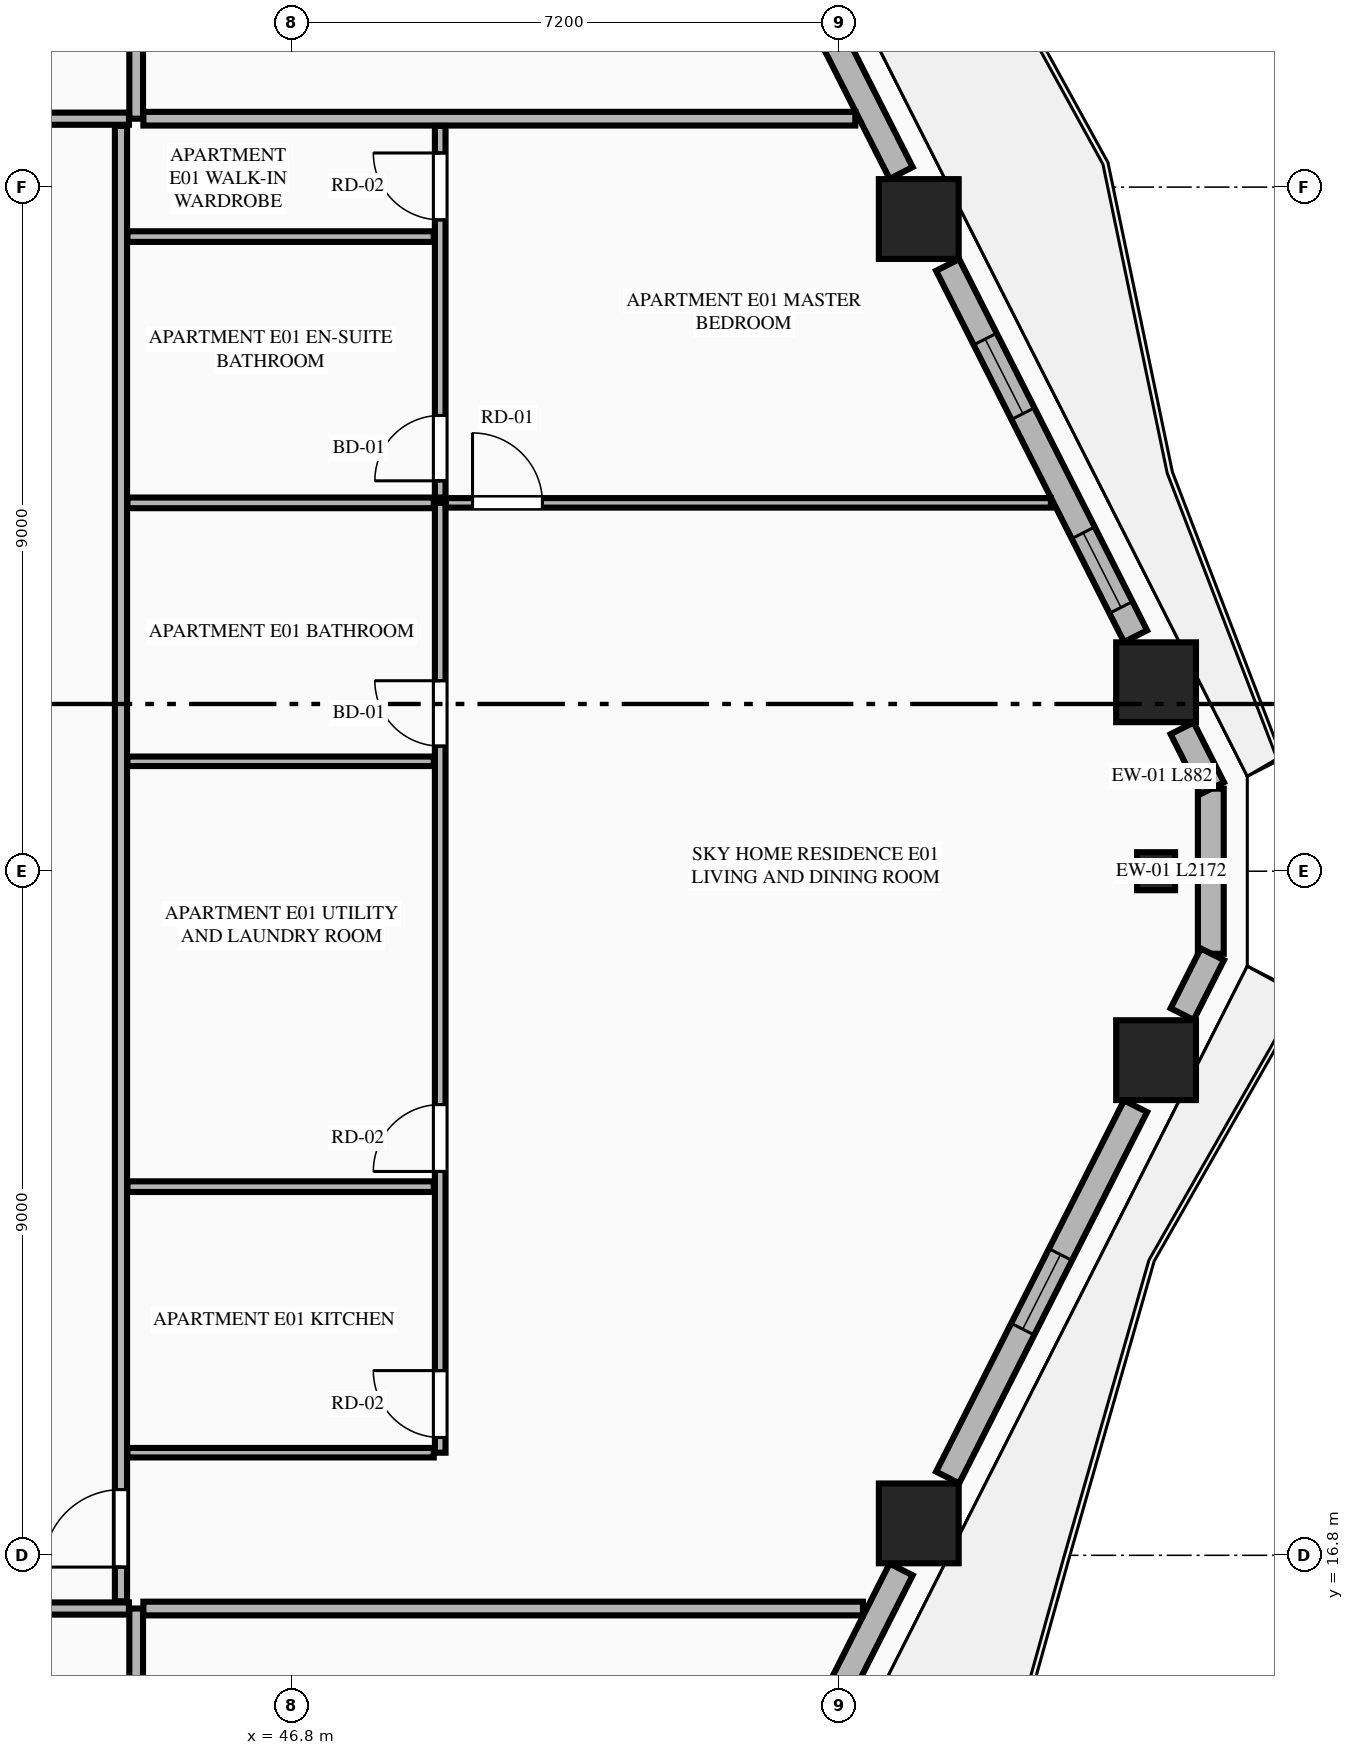
"""IFC4 building model, lengths in metres.
Left out: names, types, materials, properties, quantities, classifications, styles, units other than length and angle.
Written with IfcOpenShell. Run it as: python <this file> out.ifc"""

import sys

from ifc_helpers import new_model, si_unit, direction, frame, frame_2d, origin, origin_2d, place, context, subcontext, project, spatial, rectangle, extrude, element, fill, save


model = new_model("IFC4")
c1 = context("Model", 3, precision=1e-05, world=origin(), true_north=direction((0.0, 1.0)))
c2 = subcontext(c1, "Body", "Model", "MODEL_VIEW")
j1 = project(units=[si_unit("LENGTHUNIT", "METRE"), si_unit("PLANEANGLEUNIT", "RADIAN")], contexts=[c1])
p1 = place(None, origin())
s1 = spatial("IfcSite", under=j1, at=p1, CompositionType="ELEMENT")
p2 = place(p1, origin())
s2 = spatial("IfcBuilding", under=s1, at=p2, CompositionType="ELEMENT")
p3 = place(p2, frame((0.0, 0.0, 80.0)))
s3 = spatial("IfcBuildingStorey", under=s2, at=p3, CompositionType="ELEMENT", Elevation=80.0)
for number, where, z_axis, x_axis in (
    (1, (55.046, 17.22, 0.0), (0.0, 0.0, 1.0), (1.0, 0.0, 0.0)),
    (2, (58.168, 23.314, 0.0), (0.0, 0.0, 1.0), (1.0, 0.0, 0.0)),
    (3, (58.168, 28.286, 0.0), (0.0, 0.0, 1.0), (1.0, 0.0, 0.0)),
    (4, (55.046, 34.38, 0.0), (0.0, 0.0, 1.0), (1.0, 0.0, 0.0)),
):
    element("IfcColumn", number, at=place(p3, frame(where, z_axis=z_axis, x_axis=x_axis)), inside=s3, PredefinedType="COLUMN", context=c2, shape_type="SweptSolid", body=[
        extrude(rectangle(XDim=1.05, YDim=1.05, at=origin_2d()), origin(), (0.0, 0.0, 1.0), 3.55),
    ])
p4 = place(p3, frame((58.168, 25.8, 0.0), z_axis=(0.0, 0.0, 1.0), x_axis=(0.0, 1.0, 0.0)))
e5 = element("IfcColumn", 5, at=p4, inside=s3, PredefinedType="PILASTER", context=c2, shape_type="SweptSolid", body=[
    extrude(rectangle(XDim=0.5, YDim=0.35, at=origin_2d()), origin(), (0.0, 0.0, 1.0), 3.55),
])
p5 = place(p3, frame((58.888, 24.714, 0.0), z_axis=(0.0, 0.0, 1.0), x_axis=(0.0, 1.0, 0.0)))
e6 = element("IfcWall", 6, at=p5, inside=s3, PredefinedType="STANDARD", context=c2, shape_type="SweptSolid", body=[
    extrude(rectangle(XDim=2.172, YDim=0.34, at=frame_2d((1.086, 0.0))), origin(), (0.0, 0.0, 1.0), 3.33),
])
p6 = place(p3, frame((52.233, 11.515, 0.0), z_axis=(0.0, 0.0, 1.0), x_axis=(0.451616680182, 0.892212067942, 0.0)))
e7 = element("IfcWall", 7, at=p6, inside=s3, PredefinedType="STANDARD", context=c2, shape_type="SweptSolid", body=[
    extrude(rectangle(XDim=5.715, YDim=0.34, at=frame_2d((2.857, 0.0))), origin(), (0.0, 0.0, 1.0), 2.787),
])
p7 = place(p6, frame((1.894, 0.0, 0.0)))
e8 = element("IfcOpeningElement", 8, at=p7, cuts=e7, PredefinedType="OPENING", context=c2, shape_type="SweptSolid", body=[
    extrude(rectangle(XDim=1.1, YDim=2.25, at=frame_2d((0.55, 1.125))), frame((0.0, 0.18, 0.0), z_axis=(0.0, -1.0, 0.0), x_axis=(1.0, 0.0, 0.0)), (0.0, 0.0, 1.0), 0.36),
])
p8 = place(p3, frame((55.426, 17.824, 0.0), z_axis=(0.0, 0.0, 1.0), x_axis=(0.451579095309, 0.892231091523, 0.0)))
e9 = element("IfcWall", 9, at=p8, inside=s3, PredefinedType="STANDARD", context=c2, shape_type="SweptSolid", body=[
    extrude(rectangle(XDim=5.474, YDim=0.34, at=frame_2d((2.737, 0.0))), origin(), (0.0, 0.0, 1.0), 2.787),
])
p9 = place(p8, frame((2.187, 0.0, 0.75)))
e10 = element("IfcOpeningElement", 10, at=p9, cuts=e9, PredefinedType="OPENING", context=c2, shape_type="SweptSolid", body=[
    extrude(rectangle(XDim=1.1, YDim=1.887, at=frame_2d((0.55, 0.943))), frame((0.0, 0.18, 0.0), z_axis=(0.0, -1.0, 0.0), x_axis=(1.0, 0.0, 0.0)), (0.0, 0.0, 1.0), 0.36),
])
p10 = place(p3, frame((58.511, 23.92, 0.0), z_axis=(0.0, 0.0, 1.0), x_axis=(0.451195173259, 0.892425299747, 0.0)))
e11 = element("IfcWall", 11, at=p10, inside=s3, PredefinedType="STANDARD", context=c2, shape_type="SweptSolid", body=[
    extrude(rectangle(XDim=0.882, YDim=0.34, at=frame_2d((0.441, 0.0))), origin(), (0.0, 0.0, 1.0), 3.33),
])
p11 = place(p3, frame((58.909, 26.893, 0.0), z_axis=(0.0, 0.0, 1.0), x_axis=(-0.451306655769, 0.892368927327, 0.0)))
e12 = element("IfcWall", 12, at=p11, inside=s3, PredefinedType="STANDARD", context=c2, shape_type="SweptSolid", body=[
    extrude(rectangle(XDim=0.882, YDim=0.34, at=frame_2d((0.441, 0.0))), origin(), (0.0, 0.0, 1.0), 3.33),
])
p12 = place(p3, frame((57.898, 28.892, 0.0), z_axis=(0.0, 0.0, 1.0), x_axis=(-0.451597066012, 0.892221995901, 0.0)))
e13 = element("IfcWall", 13, at=p12, inside=s3, PredefinedType="STANDARD", context=c2, shape_type="SweptSolid", body=[
    extrude(rectangle(XDim=5.474, YDim=0.34, at=frame_2d((2.737, 0.0))), origin(), (0.0, 0.0, 1.0), 2.787),
])
p13 = place(p12, frame((0.424, 0.0, 0.75)))
e14 = element("IfcOpeningElement", 14, at=p13, cuts=e13, PredefinedType="OPENING", context=c2, shape_type="SweptSolid", body=[
    extrude(rectangle(XDim=1.1, YDim=1.887, at=frame_2d((0.55, 0.943))), frame((0.0, 0.18, 0.0), z_axis=(0.0, -1.0, 0.0), x_axis=(1.0, 0.0, 0.0)), (0.0, 0.0, 1.0), 0.36),
])
p14 = place(p12, frame((3.281, 0.0, 0.75)))
e15 = element("IfcOpeningElement", 15, at=p14, cuts=e13, PredefinedType="OPENING", context=c2, shape_type="SweptSolid", body=[
    extrude(rectangle(XDim=1.1, YDim=1.887, at=frame_2d((0.55, 0.943))), frame((0.0, 0.18, 0.0), z_axis=(0.0, -1.0, 0.0), x_axis=(1.0, 0.0, 0.0)), (0.0, 0.0, 1.0), 0.36),
])
p15 = place(p3, frame((54.814, 34.986, 0.0), z_axis=(0.0, 0.0, 1.0), x_axis=(-0.451633893529, 0.892203354744, 0.0)))
e16 = element("IfcWall", 16, at=p15, inside=s3, PredefinedType="STANDARD", context=c2, shape_type="SweptSolid", body=[
    extrude(rectangle(XDim=5.715, YDim=0.34, at=frame_2d((2.857, 0.0))), origin(), (0.0, 0.0, 1.0), 2.787),
])
p16 = place(p15, frame((2.833, 0.0, 0.0)))
e17 = element("IfcOpeningElement", 17, at=p16, cuts=e16, PredefinedType="OPENING", context=c2, shape_type="SweptSolid", body=[
    extrude(rectangle(XDim=1.1, YDim=2.25, at=frame_2d((0.55, 1.125))), frame((0.0, 0.18, 0.0), z_axis=(0.0, -1.0, 0.0), x_axis=(1.0, 0.0, 0.0)), (0.0, 0.0, 1.0), 0.36),
])
p17 = place(p3, frame((44.75, 2.455, 0.0), z_axis=(0.0, 0.0, 1.0), x_axis=(0.0, 1.0, 0.0)))
e18 = element("IfcWall", 18, at=p17, inside=s3, PredefinedType="PARTITIONING", context=c2, shape_type="SweptSolid", body=[
    extrude(rectangle(XDim=13.645, YDim=0.18, at=frame_2d((6.823, 0.0))), origin(), (0.0, 0.0, 1.0), 3.33),
])
p18 = place(p3, frame((20.145, 16.1, 0.0), z_axis=(0.0, 0.0, 1.0), x_axis=(1.0, 0.0, 0.0)))
e19 = element("IfcWall", 19, at=p18, inside=s3, PredefinedType="PARTITIONING", context=c2, shape_type="SweptSolid", body=[
    extrude(rectangle(XDim=24.51, YDim=0.16, at=frame_2d((12.255, 0.0))), origin(), (0.0, 0.0, 1.0), 3.33),
])
p19 = place(p18, frame((22.305, 0.0, 0.0)))
e20 = element("IfcOpeningElement", 20, at=p19, cuts=e19, PredefinedType="OPENING", context=c2, shape_type="SweptSolid", body=[
    extrude(rectangle(XDim=1.02, YDim=2.25, at=frame_2d((0.51, 1.125))), frame((0.0, 0.09, 0.0), z_axis=(0.0, -1.0, 0.0), x_axis=(1.0, 0.0, 0.0)), (0.0, 0.0, 1.0), 0.18),
])
p20 = place(p3, frame((44.75, 35.7, 0.0), z_axis=(0.0, 0.0, 1.0), x_axis=(0.0, 1.0, 0.0)))
e21 = element("IfcWall", 21, at=p20, inside=s3, PredefinedType="PARTITIONING", context=c2, shape_type="SweptSolid", body=[
    extrude(rectangle(XDim=13.445, YDim=0.18, at=frame_2d((6.723, 0.0))), origin(), (0.0, 0.0, 1.0), 3.33),
])
p21 = place(p3, frame((20.145, 35.7, 0.0), z_axis=(0.0, 0.0, 1.0), x_axis=(1.0, 0.0, 0.0)))
e22 = element("IfcWall", 22, at=p21, inside=s3, PredefinedType="PARTITIONING", context=c2, shape_type="SweptSolid", body=[
    extrude(rectangle(XDim=24.51, YDim=0.16, at=frame_2d((12.255, 0.0))), origin(), (0.0, 0.0, 1.0), 3.33),
])
p22 = place(p21, frame((22.305, 0.0, 0.0)))
e23 = element("IfcOpeningElement", 23, at=p22, cuts=e22, PredefinedType="OPENING", context=c2, shape_type="SweptSolid", body=[
    extrude(rectangle(XDim=1.02, YDim=2.25, at=frame_2d((0.51, 1.125))), frame((0.0, 0.09, 0.0), z_axis=(0.0, -1.0, 0.0), x_axis=(1.0, 0.0, 0.0)), (0.0, 0.0, 1.0), 0.18),
])
p23 = place(p3, frame((44.845, 16.1, 0.0), z_axis=(0.0, 0.0, 1.0), x_axis=(1.0, 0.0, 0.0)))
e24 = element("IfcWall", 24, at=p23, inside=s3, PredefinedType="PARTITIONING", context=c2, shape_type="SweptSolid", body=[
    extrude(rectangle(XDim=9.467, YDim=0.18, at=frame_2d((4.733, 0.0))), origin(), (0.0, 0.0, 1.0), 3.33),
])
p24 = place(p3, frame((44.845, 35.7, 0.0), z_axis=(0.0, 0.0, 1.0), x_axis=(1.0, 0.0, 0.0)))
e25 = element("IfcWall", 25, at=p24, inside=s3, PredefinedType="PARTITIONING", context=c2, shape_type="SweptSolid", body=[
    extrude(rectangle(XDim=9.366, YDim=0.18, at=frame_2d((4.683, 0.0))), origin(), (0.0, 0.0, 1.0), 3.33),
])
p25 = place(p3, frame((44.55, 16.195, 0.0), z_axis=(0.0, 0.0, 1.0), x_axis=(0.0, 1.0, 0.0)))
e26 = element("IfcWall", 26, at=p25, inside=s3, PredefinedType="PARTITIONING", context=c2, shape_type="SweptSolid", body=[
    extrude(rectangle(XDim=19.41, YDim=0.16, at=frame_2d((9.705, 0.0))), origin(), (0.0, 0.0, 1.0), 2.7),
])
p26 = place(p25, frame((0.45, 0.0, 0.0)))
e27 = element("IfcOpeningElement", 27, at=p26, cuts=e26, PredefinedType="OPENING", context=c2, shape_type="SweptSolid", body=[
    extrude(rectangle(XDim=1.02, YDim=2.25, at=frame_2d((0.51, 1.125))), frame((0.0, 0.09, 0.0), z_axis=(0.0, -1.0, 0.0), x_axis=(1.0, 0.0, 0.0)), (0.0, 0.0, 1.0), 0.18),
])
p27 = place(p3, frame((44.635, 18.15, 0.0), z_axis=(0.0, 0.0, 1.0), x_axis=(1.0, 0.0, 0.0)))
e28 = element("IfcWall", 28, at=p27, inside=s3, PredefinedType="PARTITIONING", context=c2, shape_type="SweptSolid", body=[
    extrude(rectangle(XDim=4.03, YDim=0.125, at=frame_2d((2.015, 0.0))), origin(), (0.0, 0.0, 1.0), 2.7),
])
p28 = place(p3, frame((48.75, 18.15, 0.0), z_axis=(0.0, 0.0, 1.0), x_axis=(0.0, 1.0, 0.0)))
e29 = element("IfcWall", 29, at=p28, inside=s3, PredefinedType="PLUMBINGWALL", context=c2, shape_type="SweptSolid", body=[
    extrude(rectangle(XDim=12.496, YDim=0.14, at=frame_2d((6.248, 0.0))), origin(), (0.0, 0.0, 1.0), 3.33),
])
p29 = place(p28, frame((0.2, 0.0, 0.0)))
e30 = element("IfcOpeningElement", 30, at=p29, cuts=e29, PredefinedType="OPENING", context=c2, shape_type="SweptSolid", body=[
    extrude(rectangle(XDim=0.88, YDim=2.15, at=frame_2d((0.44, 1.075))), frame((0.0, 0.08, 0.0), z_axis=(0.0, -1.0, 0.0), x_axis=(1.0, 0.0, 0.0)), (0.0, 0.0, 1.0), 0.16),
])
p30 = place(p28, frame((3.7, 0.0, 0.0)))
e31 = element("IfcOpeningElement", 31, at=p30, cuts=e29, PredefinedType="OPENING", context=c2, shape_type="SweptSolid", body=[
    extrude(rectangle(XDim=0.88, YDim=2.15, at=frame_2d((0.44, 1.075))), frame((0.0, 0.08, 0.0), z_axis=(0.0, -1.0, 0.0), x_axis=(1.0, 0.0, 0.0)), (0.0, 0.0, 1.0), 0.16),
])
p31 = place(p28, frame((9.296, 0.0, 0.0)))
e32 = element("IfcOpeningElement", 32, at=p31, cuts=e29, PredefinedType="OPENING", context=c2, shape_type="SweptSolid", body=[
    extrude(rectangle(XDim=0.86, YDim=2.1, at=frame_2d((0.43, 1.05))), frame((0.0, 0.08, 0.0), z_axis=(0.0, -1.0, 0.0), x_axis=(1.0, 0.0, 0.0)), (0.0, 0.0, 1.0), 0.16),
])
p32 = place(p3, frame((48.75, 30.716, 0.0), z_axis=(0.0, 0.0, 1.0), x_axis=(0.0, 1.0, 0.0)))
e33 = element("IfcWall", 33, at=p32, inside=s3, PredefinedType="PLUMBINGWALL", context=c2, shape_type="SweptSolid", body=[
    extrude(rectangle(XDim=4.889, YDim=0.14, at=frame_2d((2.444, 0.0))), origin(), (0.0, 0.0, 1.0), 3.33),
])
p33 = place(p32, frame((0.22, 0.0, 0.0)))
e34 = element("IfcOpeningElement", 34, at=p33, cuts=e33, PredefinedType="OPENING", context=c2, shape_type="SweptSolid", body=[
    extrude(rectangle(XDim=0.86, YDim=2.1, at=frame_2d((0.43, 1.05))), frame((0.0, 0.08, 0.0), z_axis=(0.0, -1.0, 0.0), x_axis=(1.0, 0.0, 0.0)), (0.0, 0.0, 1.0), 0.16),
])
p34 = place(p32, frame((3.653, 0.0, 0.0)))
e35 = element("IfcOpeningElement", 35, at=p34, cuts=e33, PredefinedType="OPENING", context=c2, shape_type="SweptSolid", body=[
    extrude(rectangle(XDim=0.88, YDim=2.15, at=frame_2d((0.44, 1.075))), frame((0.0, 0.08, 0.0), z_axis=(0.0, -1.0, 0.0), x_axis=(1.0, 0.0, 0.0)), (0.0, 0.0, 1.0), 0.16),
])
p35 = place(p3, frame((44.635, 30.646, 0.0), z_axis=(0.0, 0.0, 1.0), x_axis=(1.0, 0.0, 0.0)))
e36 = element("IfcWall", 36, at=p35, inside=s3, PredefinedType="PLUMBINGWALL", context=c2, shape_type="SweptSolid", body=[
    extrude(rectangle(XDim=4.03, YDim=0.14, at=frame_2d((2.015, 0.0))), origin(), (0.0, 0.0, 1.0), 3.33),
])
p36 = place(p3, frame((48.825, 30.646, 0.0), z_axis=(0.0, 0.0, 1.0), x_axis=(1.0, 0.0, 0.0)))
e37 = element("IfcWall", 37, at=p36, inside=s3, PredefinedType="PARTITIONING", context=c2, shape_type="SweptSolid", body=[
    extrude(rectangle(XDim=7.959, YDim=0.125, at=frame_2d((3.979, 0.0))), origin(), (0.0, 0.0, 1.0), 3.33),
])
p37 = place(p36, frame((0.35, 0.0, 0.0)))
e38 = element("IfcOpeningElement", 38, at=p37, cuts=e37, PredefinedType="OPENING", context=c2, shape_type="SweptSolid", body=[
    extrude(rectangle(XDim=0.92, YDim=2.15, at=frame_2d((0.46, 1.075))), frame((0.0, 0.073, 0.0), z_axis=(0.0, -1.0, 0.0), x_axis=(1.0, 0.0, 0.0)), (0.0, 0.0, 1.0), 0.145),
])
p38 = place(p3, frame((44.635, 21.65, 0.0), z_axis=(0.0, 0.0, 1.0), x_axis=(1.0, 0.0, 0.0)))
e39 = element("IfcWall", 39, at=p38, inside=s3, PredefinedType="PLUMBINGWALL", context=c2, shape_type="SweptSolid", body=[
    extrude(rectangle(XDim=4.03, YDim=0.14, at=frame_2d((2.015, 0.0))), origin(), (0.0, 0.0, 1.0), 3.33),
])
p39 = place(p3, frame((44.635, 27.246, 0.0), z_axis=(0.0, 0.0, 1.0), x_axis=(1.0, 0.0, 0.0)))
e40 = element("IfcWall", 40, at=p39, inside=s3, PredefinedType="PARTITIONING", context=c2, shape_type="SweptSolid", body=[
    extrude(rectangle(XDim=4.03, YDim=0.125, at=frame_2d((2.015, 0.0))), origin(), (0.0, 0.0, 1.0), 3.33),
])
p40 = place(p3, frame((44.635, 34.149, 0.0), z_axis=(0.0, 0.0, 1.0), x_axis=(1.0, 0.0, 0.0)))
e41 = element("IfcWall", 41, at=p40, inside=s3, PredefinedType="PLUMBINGWALL", context=c2, shape_type="SweptSolid", body=[
    extrude(rectangle(XDim=4.03, YDim=0.14, at=frame_2d((2.015, 0.0))), origin(), (0.0, 0.0, 1.0), 2.7),
])
p41 = place(p9, origin())
e42 = element("IfcWindow", 42, at=p41, inside=s3, PartitioningType="SINGLE_PANEL", PredefinedType="WINDOW", context=c2, shape_type="SweptSolid", body=[
    extrude(rectangle(XDim=1.1, YDim=1.887, at=frame_2d((0.55, 0.943))), frame((0.0, 0.03, 0.0), z_axis=(0.0, -1.0, 0.0), x_axis=(1.0, 0.0, 0.0)), (0.0, 0.0, 1.0), 0.06),
])
fill(e10, e42)
p42 = place(p13, origin())
e43 = element("IfcWindow", 43, at=p42, inside=s3, PartitioningType="SINGLE_PANEL", PredefinedType="WINDOW", context=c2, shape_type="SweptSolid", body=[
    extrude(rectangle(XDim=1.1, YDim=1.887, at=frame_2d((0.55, 0.943))), frame((0.0, 0.03, 0.0), z_axis=(0.0, -1.0, 0.0), x_axis=(1.0, 0.0, 0.0)), (0.0, 0.0, 1.0), 0.06),
])
fill(e14, e43)
p43 = place(p29, origin())
e44 = element("IfcDoor", 44, at=p43, inside=s3, OperationType="SINGLE_SWING_RIGHT", PredefinedType="DOOR", context=c2, shape_type="SweptSolid", body=[
    extrude(rectangle(XDim=0.88, YDim=2.15, at=frame_2d((0.44, 1.075))), frame((0.0, 0.025, 0.0), z_axis=(0.0, -1.0, 0.0), x_axis=(1.0, 0.0, 0.0)), (0.0, 0.0, 1.0), 0.05),
])
fill(e30, e44)
p44 = place(p30, origin())
e45 = element("IfcDoor", 45, at=p44, inside=s3, OperationType="SINGLE_SWING_LEFT", PredefinedType="DOOR", context=c2, shape_type="SweptSolid", body=[
    extrude(rectangle(XDim=0.88, YDim=2.15, at=frame_2d((0.44, 1.075))), frame((0.0, 0.025, 0.0), z_axis=(0.0, -1.0, 0.0), x_axis=(1.0, 0.0, 0.0)), (0.0, 0.0, 1.0), 0.05),
])
fill(e31, e45)
p45 = place(p31, origin())
e46 = element("IfcDoor", 46, at=p45, inside=s3, OperationType="SINGLE_SWING_RIGHT", PredefinedType="DOOR", context=c2, shape_type="SweptSolid", body=[
    extrude(rectangle(XDim=0.86, YDim=2.1, at=frame_2d((0.43, 1.05))), frame((0.0, 0.025, 0.0), z_axis=(0.0, -1.0, 0.0), x_axis=(1.0, 0.0, 0.0)), (0.0, 0.0, 1.0), 0.05),
])
fill(e32, e46)
p46 = place(p33, origin())
e47 = element("IfcDoor", 47, at=p46, inside=s3, OperationType="SINGLE_SWING_LEFT", PredefinedType="DOOR", context=c2, shape_type="SweptSolid", body=[
    extrude(rectangle(XDim=0.86, YDim=2.1, at=frame_2d((0.43, 1.05))), frame((0.0, 0.025, 0.0), z_axis=(0.0, -1.0, 0.0), x_axis=(1.0, 0.0, 0.0)), (0.0, 0.0, 1.0), 0.05),
])
fill(e34, e47)
p47 = place(p34, origin())
e48 = element("IfcDoor", 48, at=p47, inside=s3, OperationType="SINGLE_SWING_RIGHT", PredefinedType="DOOR", context=c2, shape_type="SweptSolid", body=[
    extrude(rectangle(XDim=0.88, YDim=2.15, at=frame_2d((0.44, 1.075))), frame((0.0, 0.025, 0.0), z_axis=(0.0, -1.0, 0.0), x_axis=(1.0, 0.0, 0.0)), (0.0, 0.0, 1.0), 0.05),
])
fill(e35, e48)
p48 = place(p26, origin())
e49 = element("IfcDoor", 49, at=p48, inside=s3, OperationType="SINGLE_SWING_LEFT", PredefinedType="DOOR", context=c2, shape_type="SweptSolid", body=[
    extrude(rectangle(XDim=1.02, YDim=2.25, at=frame_2d((0.51, 1.125))), frame((0.0, 0.025, 0.0), z_axis=(0.0, -1.0, 0.0), x_axis=(1.0, 0.0, 0.0)), (0.0, 0.0, 1.0), 0.05),
])
fill(e27, e49)
p49 = place(p37, origin())
e50 = element("IfcDoor", 50, at=p49, inside=s3, OperationType="SINGLE_SWING_LEFT", PredefinedType="DOOR", context=c2, shape_type="SweptSolid", body=[
    extrude(rectangle(XDim=0.92, YDim=2.15, at=frame_2d((0.46, 1.075))), frame((0.0, 0.025, 0.0), z_axis=(0.0, -1.0, 0.0), x_axis=(1.0, 0.0, 0.0)), (0.0, 0.0, 1.0), 0.05),
])
fill(e38, e50)
p50 = place(p14, origin())
e51 = element("IfcWindow", 51, at=p50, inside=s3, PartitioningType="SINGLE_PANEL", PredefinedType="WINDOW", context=c2, shape_type="SweptSolid", body=[
    extrude(rectangle(XDim=1.1, YDim=1.887, at=frame_2d((0.55, 0.943))), frame((0.0, 0.03, 0.0), z_axis=(0.0, -1.0, 0.0), x_axis=(1.0, 0.0, 0.0)), (0.0, 0.0, 1.0), 0.06),
])
fill(e15, e51)
save(model, sys.argv[1])
